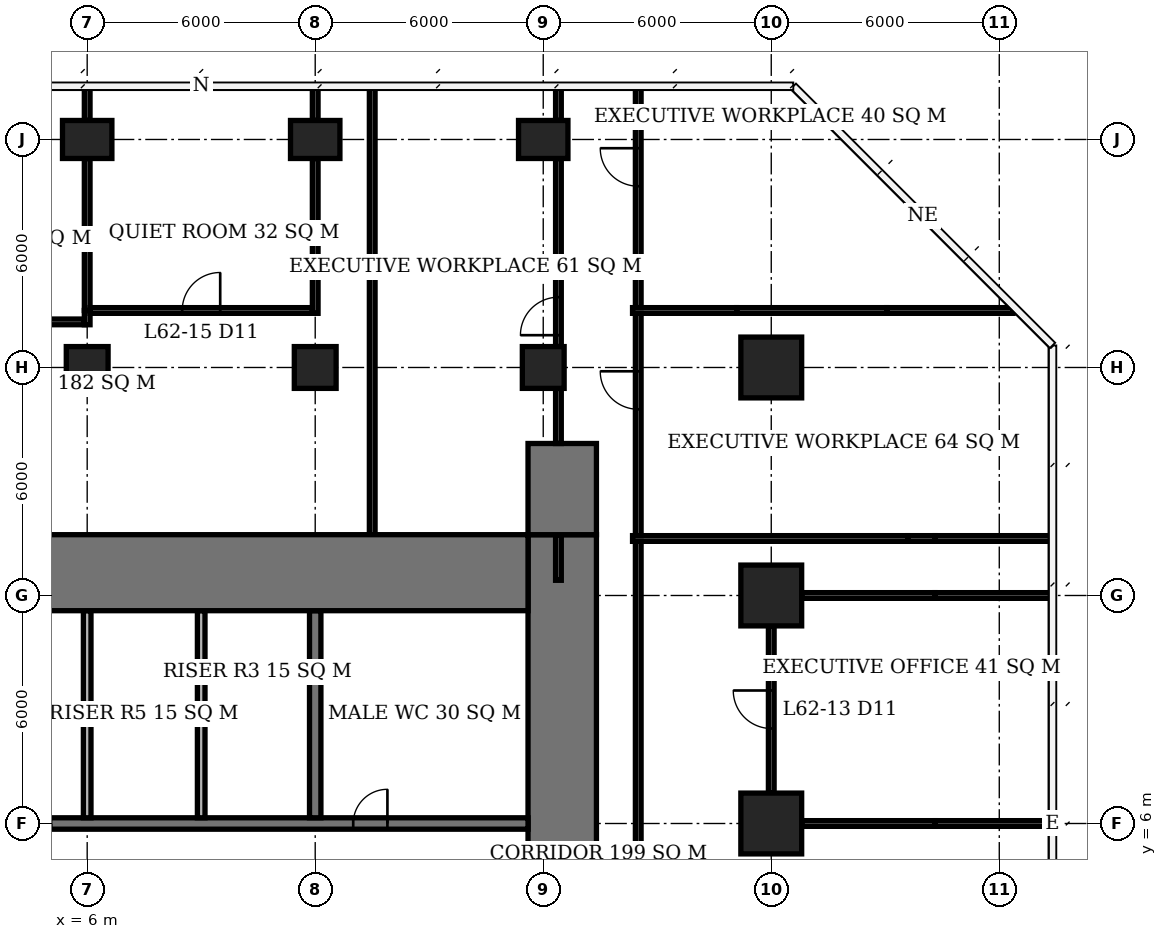
"""IFC4 building model, lengths in metres.
Left out: names, types, materials, properties, quantities, classifications, styles, units other than length and angle.
Written with IfcOpenShell. Run it as: python <this file> out.ifc"""

import sys

from ifc_helpers import new_model, si_unit, direction, frame, frame_2d, origin, origin_2d, place, context, subcontext, project, spatial, rectangle, extrude, element, fill, save


model = new_model("IFC4")
c1 = context("Model", 3, precision=1e-05, world=origin(), true_north=direction((0.0, 1.0)))
c2 = subcontext(c1, "Body", "Model", "MODEL_VIEW")
j1 = project(units=[si_unit("LENGTHUNIT", "METRE"), si_unit("PLANEANGLEUNIT", "RADIAN")], contexts=[c1])
p1 = place(None, origin())
s1 = spatial("IfcSite", under=j1, at=p1, CompositionType="ELEMENT")
p2 = place(p1, origin())
s2 = spatial("IfcBuilding", under=s1, at=p2, CompositionType="ELEMENT")
p3 = place(p2, frame((0.0, 0.0, 252.8)))
s3 = spatial("IfcBuildingStorey", under=s2, at=p3, CompositionType="ELEMENT", Elevation=252.8)
p4 = place(p3, frame((6.0, 18.0, 0.0), z_axis=(0.0, 0.0, 1.0), x_axis=(1.0, 0.0, 0.0)))
e1 = element("IfcColumn", 1, at=p4, inside=s3, PredefinedType="COLUMN", context=c2, shape_type="SweptSolid", body=[
    extrude(rectangle(XDim=1.1, YDim=1.1, at=origin_2d()), origin(), (0.0, 0.0, 1.0), 3.9),
])
p5 = place(p3, frame((6.0, 24.0, 0.0), z_axis=(0.0, 0.0, 1.0), x_axis=(1.0, 0.0, 0.0)))
e2 = element("IfcColumn", 2, at=p5, inside=s3, PredefinedType="COLUMN", context=c2, shape_type="SweptSolid", body=[
    extrude(rectangle(XDim=1.3, YDim=1.0, at=origin_2d()), origin(), (0.0, 0.0, 1.0), 3.9),
])
p6 = place(p3, frame((12.0, 18.0, 0.0), z_axis=(0.0, 0.0, 1.0), x_axis=(1.0, 0.0, 0.0)))
e3 = element("IfcColumn", 3, at=p6, inside=s3, PredefinedType="COLUMN", context=c2, shape_type="SweptSolid", body=[
    extrude(rectangle(XDim=1.1, YDim=1.1, at=origin_2d()), origin(), (0.0, 0.0, 1.0), 3.9),
])
p7 = place(p3, frame((12.0, 24.0, 0.0), z_axis=(0.0, 0.0, 1.0), x_axis=(1.0, 0.0, 0.0)))
e4 = element("IfcColumn", 4, at=p7, inside=s3, PredefinedType="COLUMN", context=c2, shape_type="SweptSolid", body=[
    extrude(rectangle(XDim=1.3, YDim=1.0, at=origin_2d()), origin(), (0.0, 0.0, 1.0), 3.9),
])
p8 = place(p3, frame((18.0, 18.0, 0.0), z_axis=(0.0, 0.0, 1.0), x_axis=(1.0, 0.0, 0.0)))
e5 = element("IfcColumn", 5, at=p8, inside=s3, PredefinedType="COLUMN", context=c2, shape_type="SweptSolid", body=[
    extrude(rectangle(XDim=1.1, YDim=1.1, at=origin_2d()), origin(), (0.0, 0.0, 1.0), 3.9),
])
p9 = place(p3, frame((18.0, 24.0, 0.0), z_axis=(0.0, 0.0, 1.0), x_axis=(1.0, 0.0, 0.0)))
e6 = element("IfcColumn", 6, at=p9, inside=s3, PredefinedType="COLUMN", context=c2, shape_type="SweptSolid", body=[
    extrude(rectangle(XDim=1.3, YDim=1.0, at=origin_2d()), origin(), (0.0, 0.0, 1.0), 3.9),
])
for number, where, z_axis, x_axis in (
    (7, (24.0, 6.0, 0.0), (0.0, 0.0, 1.0), (1.0, 0.0, 0.0)),
    (8, (24.0, 12.0, 0.0), (0.0, 0.0, 1.0), (1.0, 0.0, 0.0)),
    (9, (24.0, 18.0, 0.0), (0.0, 0.0, 1.0), (1.0, 0.0, 0.0)),
):
    element("IfcColumn", number, at=place(p3, frame(where, z_axis=z_axis, x_axis=x_axis)), inside=s3, PredefinedType="COLUMN", context=c2, shape_type="SweptSolid", body=[
        extrude(rectangle(XDim=1.6, YDim=1.6, at=origin_2d()), origin(), (0.0, 0.0, 1.0), 3.9),
    ])
p10 = place(p3, frame((-5.6, 12.6, 0.0), z_axis=(0.0, 0.0, 1.0), x_axis=(1.0, 0.0, 0.0)))
e10 = element("IfcWall", 10, at=p10, inside=s3, PredefinedType="SHEAR", context=c2, shape_type="SweptSolid", body=[
    extrude(rectangle(XDim=23.2, YDim=2.0, at=frame_2d((11.6, 0.0))), origin(), (0.0, 0.0, 1.0), 3.9),
])
p11 = place(p3, frame((18.5, -7.6, 0.0), z_axis=(0.0, 0.0, 1.0), x_axis=(0.0, 1.0, 0.0)))
e11 = element("IfcWall", 11, at=p11, inside=s3, PredefinedType="SHEAR", context=c2, shape_type="SweptSolid", body=[
    extrude(rectangle(XDim=21.2, YDim=1.8, at=frame_2d((10.6, 0.0))), origin(), (0.0, 0.0, 1.0), 3.9),
])
p12 = place(p11, frame((9.2, 0.0, 0.0)))
e12 = element("IfcOpeningElement", 12, at=p12, cuts=e11, PredefinedType="OPENING", context=c2, shape_type="SweptSolid", body=[
    extrude(rectangle(XDim=1.8, YDim=2.4, at=frame_2d((0.9, 1.2))), frame((0.0, 0.91, 0.0), z_axis=(0.0, -1.0, 0.0), x_axis=(1.0, 0.0, 0.0)), (0.0, 0.0, 1.0), 1.82),
])
p13 = place(p3, frame((18.5, 13.6, 0.0), z_axis=(0.0, 0.0, 1.0), x_axis=(0.0, 1.0, 0.0)))
e13 = element("IfcWall", 13, at=p13, inside=s3, PredefinedType="SHEAR", context=c2, shape_type="SweptSolid", body=[
    extrude(rectangle(XDim=2.4, YDim=1.8, at=frame_2d((1.2, 0.0))), origin(), (0.0, 0.0, 1.0), 3.9),
])
p14 = place(p3, frame((-0.15, 6.0, 0.0), z_axis=(0.0, 0.0, 1.0), x_axis=(1.0, 0.0, 0.0)))
e14 = element("IfcWall", 14, at=p14, inside=s3, PredefinedType="SHEAR", context=c2, shape_type="SweptSolid", body=[
    extrude(rectangle(XDim=17.75, YDim=0.3, at=frame_2d((8.875, 0.0))), origin(), (0.0, 0.0, 1.0), 3.9),
])
p15 = place(p14, frame((13.15, 0.0, 0.0)))
e15 = element("IfcOpeningElement", 15, at=p15, cuts=e14, PredefinedType="OPENING", context=c2, shape_type="SweptSolid", body=[
    extrude(rectangle(XDim=0.9, YDim=2.1, at=frame_2d((0.45, 1.05))), frame((0.0, 0.16, 0.0), z_axis=(0.0, -1.0, 0.0), x_axis=(1.0, 0.0, 0.0)), (0.0, 0.0, 1.0), 0.32),
])
p16 = place(p14, frame((1.1, 0.0, 0.0)))
e16 = element("IfcOpeningElement", 16, at=p16, cuts=e14, PredefinedType="OPENING", context=c2, shape_type="SweptSolid", body=[
    extrude(rectangle(XDim=1.1, YDim=2.1, at=frame_2d((0.55, 1.05))), frame((0.0, 0.16, 0.0), z_axis=(0.0, -1.0, 0.0), x_axis=(1.0, 0.0, 0.0)), (0.0, 0.0, 1.0), 0.32),
])
p17 = place(p14, frame((4.1, 0.0, 0.0)))
e17 = element("IfcOpeningElement", 17, at=p17, cuts=e14, PredefinedType="OPENING", context=c2, shape_type="SweptSolid", body=[
    extrude(rectangle(XDim=1.1, YDim=2.1, at=frame_2d((0.55, 1.05))), frame((0.0, 0.16, 0.0), z_axis=(0.0, -1.0, 0.0), x_axis=(1.0, 0.0, 0.0)), (0.0, 0.0, 1.0), 0.32),
])
p18 = place(p3, frame((12.0, 6.15, 0.0), z_axis=(0.0, 0.0, 1.0), x_axis=(0.0, 1.0, 0.0)))
e18 = element("IfcWall", 18, at=p18, inside=s3, PredefinedType="SHEAR", context=c2, shape_type="SweptSolid", body=[
    extrude(rectangle(XDim=5.45, YDim=0.3, at=frame_2d((2.725, 0.0))), origin(), (0.0, 0.0, 1.0), 3.9),
])
for number, where, z_axis, x_axis in (
    (19, (6.0, 6.15, 0.0), (0.0, 0.0, 1.0), (0.0, 1.0, 0.0)),
    (20, (9.0, 6.15, 0.0), (0.0, 0.0, 1.0), (0.0, 1.0, 0.0)),
):
    element("IfcWall", number, at=place(p3, frame(where, z_axis=z_axis, x_axis=x_axis)), inside=s3, PredefinedType="SOLIDWALL", context=c2, shape_type="SweptSolid", body=[
        extrude(rectangle(XDim=5.45, YDim=0.2, at=frame_2d((2.725, 0.0))), origin(), (0.0, 0.0, 1.0), 3.9),
    ])
p19 = place(p3, frame((24.8, 6.0, 0.0), z_axis=(0.0, 0.0, 1.0), x_axis=(1.0, 0.0, 0.0)))
e21 = element("IfcWall", 21, at=p19, inside=s3, PredefinedType="PARTITIONING", context=c2, shape_type="SweptSolid", body=[
    extrude(rectangle(XDim=3.51, YDim=0.15, at=frame_2d((1.755, 0.0))), origin(), (0.0, 0.0, 1.0), 2.65),
])
p20 = place(p3, frame((28.31, 6.0, 0.0), z_axis=(0.0, 0.0, 1.0), x_axis=(1.0, 0.0, 0.0)))
e22 = element("IfcWall", 22, at=p20, inside=s3, PredefinedType="PARTITIONING", context=c2, shape_type="SweptSolid", body=[
    extrude(rectangle(XDim=3.04, YDim=0.15, at=frame_2d((1.52, 0.0))), origin(), (0.0, 0.0, 1.0), 3.65),
])
p21 = place(p3, frame((24.8, 12.0, 0.0), z_axis=(0.0, 0.0, 1.0), x_axis=(1.0, 0.0, 0.0)))
e23 = element("IfcWall", 23, at=p21, inside=s3, PredefinedType="PARTITIONING", context=c2, shape_type="SweptSolid", body=[
    extrude(rectangle(XDim=3.51, YDim=0.15, at=frame_2d((1.755, 0.0))), origin(), (0.0, 0.0, 1.0), 2.65),
])
p22 = place(p3, frame((28.31, 12.0, 0.0), z_axis=(0.0, 0.0, 1.0), x_axis=(1.0, 0.0, 0.0)))
e24 = element("IfcWall", 24, at=p22, inside=s3, PredefinedType="PARTITIONING", context=c2, shape_type="SweptSolid", body=[
    extrude(rectangle(XDim=3.065, YDim=0.15, at=frame_2d((1.532, 0.0))), origin(), (0.0, 0.0, 1.0), 3.65),
])
p23 = place(p3, frame((0.075, 19.2, 0.0), z_axis=(0.0, 0.0, 1.0), x_axis=(1.0, 0.0, 0.0)))
e25 = element("IfcWall", 25, at=p23, inside=s3, PredefinedType="PARTITIONING", context=c2, shape_type="SweptSolid", body=[
    extrude(rectangle(XDim=5.85, YDim=0.15, at=frame_2d((2.925, 0.0))), origin(), (0.0, 0.0, 1.0), 3.65),
])
p24 = place(p23, frame((2.425, 0.0, 0.0)))
e26 = element("IfcOpeningElement", 26, at=p24, cuts=e25, PredefinedType="OPENING", context=c2, shape_type="SweptSolid", body=[
    extrude(rectangle(XDim=1.0, YDim=2.4, at=frame_2d((0.5, 1.2))), frame((0.0, 0.085, 0.0), z_axis=(0.0, -1.0, 0.0), x_axis=(1.0, 0.0, 0.0)), (0.0, 0.0, 1.0), 0.17),
])
p25 = place(p3, frame((6.075, 19.5, 0.0), z_axis=(0.0, 0.0, 1.0), x_axis=(1.0, 0.0, 0.0)))
e27 = element("IfcWall", 27, at=p25, inside=s3, PredefinedType="PARTITIONING", context=c2, shape_type="SweptSolid", body=[
    extrude(rectangle(XDim=5.85, YDim=0.15, at=frame_2d((2.925, 0.0))), origin(), (0.0, 0.0, 1.0), 3.65),
])
p26 = place(p25, frame((2.425, 0.0, 0.0)))
e28 = element("IfcOpeningElement", 28, at=p26, cuts=e27, PredefinedType="OPENING", context=c2, shape_type="SweptSolid", body=[
    extrude(rectangle(XDim=1.0, YDim=2.4, at=frame_2d((0.5, 1.2))), frame((0.0, 0.085, 0.0), z_axis=(0.0, -1.0, 0.0), x_axis=(1.0, 0.0, 0.0)), (0.0, 0.0, 1.0), 0.17),
])
p27 = place(p3, frame((6.0, 19.125, 0.0), z_axis=(0.0, 0.0, 1.0), x_axis=(0.0, 1.0, 0.0)))
e29 = element("IfcWall", 29, at=p27, inside=s3, PredefinedType="PARTITIONING", context=c2, shape_type="SweptSolid", body=[
    extrude(rectangle(XDim=0.375, YDim=0.15, at=frame_2d((0.188, 0.0))), origin(), (0.0, 0.0, 1.0), 3.65),
])
p28 = place(p3, frame((6.0, 19.5, 0.0), z_axis=(0.0, 0.0, 1.0), x_axis=(0.0, 1.0, 0.0)))
e30 = element("IfcWall", 30, at=p28, inside=s3, PredefinedType="PARTITIONING", context=c2, shape_type="SweptSolid", body=[
    extrude(rectangle(XDim=4.0, YDim=0.15, at=frame_2d((2.0, 0.0))), origin(), (0.0, 0.0, 1.0), 3.65),
])
p29 = place(p3, frame((6.0, 24.5, 0.0), z_axis=(0.0, 0.0, 1.0), x_axis=(0.0, 1.0, 0.0)))
e31 = element("IfcWall", 31, at=p29, inside=s3, PredefinedType="PARTITIONING", context=c2, shape_type="SweptSolid", body=[
    extrude(rectangle(XDim=0.85, YDim=0.15, at=frame_2d((0.425, 0.0))), origin(), (0.0, 0.0, 1.0), 3.65),
])
p30 = place(p3, frame((12.0, 19.425, 0.0), z_axis=(0.0, 0.0, 1.0), x_axis=(0.0, 1.0, 0.0)))
e32 = element("IfcWall", 32, at=p30, inside=s3, PredefinedType="PARTITIONING", context=c2, shape_type="SweptSolid", body=[
    extrude(rectangle(XDim=4.075, YDim=0.15, at=frame_2d((2.038, 0.0))), origin(), (0.0, 0.0, 1.0), 3.65),
])
p31 = place(p3, frame((12.0, 24.5, 0.0), z_axis=(0.0, 0.0, 1.0), x_axis=(0.0, 1.0, 0.0)))
e33 = element("IfcWall", 33, at=p31, inside=s3, PredefinedType="PARTITIONING", context=c2, shape_type="SweptSolid", body=[
    extrude(rectangle(XDim=0.85, YDim=0.15, at=frame_2d((0.425, 0.0))), origin(), (0.0, 0.0, 1.0), 3.65),
])
p32 = place(p3, frame((24.0, 6.8, 0.0), z_axis=(0.0, 0.0, 1.0), x_axis=(0.0, 1.0, 0.0)))
e34 = element("IfcWall", 34, at=p32, inside=s3, PredefinedType="PARTITIONING", context=c2, shape_type="SweptSolid", body=[
    extrude(rectangle(XDim=4.4, YDim=0.15, at=frame_2d((2.2, 0.0))), origin(), (0.0, 0.0, 1.0), 3.65),
])
p33 = place(p32, frame((1.7, 0.0, 0.0)))
e35 = element("IfcOpeningElement", 35, at=p33, cuts=e34, PredefinedType="OPENING", context=c2, shape_type="SweptSolid", body=[
    extrude(rectangle(XDim=1.0, YDim=2.4, at=frame_2d((0.5, 1.2))), frame((0.0, 0.085, 0.0), z_axis=(0.0, -1.0, 0.0), x_axis=(1.0, 0.0, 0.0)), (0.0, 0.0, 1.0), 0.17),
])
p34 = place(p3, frame((13.5, 12.4, 0.0), z_axis=(0.0, 0.0, 1.0), x_axis=(0.0, 1.0, 0.0)))
e36 = element("IfcWall", 36, at=p34, inside=s3, PredefinedType="PARTITIONING", context=c2, shape_type="SweptSolid", body=[
    extrude(rectangle(XDim=12.975, YDim=0.15, at=frame_2d((6.488, 0.0))), origin(), (0.0, 0.0, 1.0), 3.65),
])
p35 = place(p3, frame((18.4, 12.4, 0.0), z_axis=(0.0, 0.0, 1.0), x_axis=(0.0, 1.0, 0.0)))
e37 = element("IfcWall", 37, at=p35, inside=s3, PredefinedType="PARTITIONING", context=c2, shape_type="SweptSolid", body=[
    extrude(rectangle(XDim=1.2, YDim=0.15, at=frame_2d((0.6, 0.0))), origin(), (0.0, 0.0, 1.0), 3.65),
])
p36 = place(p3, frame((18.4, 16.0, 0.0), z_axis=(0.0, 0.0, 1.0), x_axis=(0.0, 1.0, 0.0)))
e38 = element("IfcWall", 38, at=p36, inside=s3, PredefinedType="PARTITIONING", context=c2, shape_type="SweptSolid", body=[
    extrude(rectangle(XDim=1.45, YDim=0.15, at=frame_2d((0.725, 0.0))), origin(), (0.0, 0.0, 1.0), 3.65),
])
p37 = place(p3, frame((18.4, 18.55, 0.0), z_axis=(0.0, 0.0, 1.0), x_axis=(0.0, 1.0, 0.0)))
e39 = element("IfcWall", 39, at=p37, inside=s3, PredefinedType="PARTITIONING", context=c2, shape_type="SweptSolid", body=[
    extrude(rectangle(XDim=4.95, YDim=0.15, at=frame_2d((2.475, 0.0))), origin(), (0.0, 0.0, 1.0), 3.65),
])
p38 = place(p37, frame((0.3, 0.0, 0.0)))
e40 = element("IfcOpeningElement", 40, at=p38, cuts=e39, PredefinedType="OPENING", context=c2, shape_type="SweptSolid", body=[
    extrude(rectangle(XDim=1.0, YDim=2.4, at=frame_2d((0.5, 1.2))), frame((0.0, 0.085, 0.0), z_axis=(0.0, -1.0, 0.0), x_axis=(1.0, 0.0, 0.0)), (0.0, 0.0, 1.0), 0.17),
])
p39 = place(p3, frame((18.4, 24.5, 0.0), z_axis=(0.0, 0.0, 1.0), x_axis=(0.0, 1.0, 0.0)))
e41 = element("IfcWall", 41, at=p39, inside=s3, PredefinedType="PARTITIONING", context=c2, shape_type="SweptSolid", body=[
    extrude(rectangle(XDim=0.85, YDim=0.15, at=frame_2d((0.425, 0.0))), origin(), (0.0, 0.0, 1.0), 3.65),
])
p40 = place(p3, frame((20.5, -13.375, 0.0), z_axis=(0.0, 0.0, 1.0), x_axis=(0.0, 1.0, 0.0)))
e42 = element("IfcWall", 42, at=p40, inside=s3, PredefinedType="PARTITIONING", context=c2, shape_type="SweptSolid", body=[
    extrude(rectangle(XDim=26.8, YDim=0.15, at=frame_2d((13.4, 0.0))), origin(), (0.0, 0.0, 1.0), 3.65),
])
p41 = place(p40, frame((16.995, 0.0, 0.0)))
e43 = element("IfcOpeningElement", 43, at=p41, cuts=e42, PredefinedType="OPENING", context=c2, shape_type="SweptSolid", body=[
    extrude(rectangle(XDim=1.0, YDim=2.4, at=frame_2d((0.5, 1.2))), frame((0.0, 0.085, 0.0), z_axis=(0.0, -1.0, 0.0), x_axis=(1.0, 0.0, 0.0)), (0.0, 0.0, 1.0), 0.17),
])
p42 = place(p3, frame((20.5, 13.575, 0.0), z_axis=(0.0, 0.0, 1.0), x_axis=(0.0, 1.0, 0.0)))
e44 = element("IfcWall", 44, at=p42, inside=s3, PredefinedType="PARTITIONING", context=c2, shape_type="SweptSolid", body=[
    extrude(rectangle(XDim=5.85, YDim=0.15, at=frame_2d((2.925, 0.0))), origin(), (0.0, 0.0, 1.0), 3.65),
])
p43 = place(p42, frame((3.325, 0.0, 0.0)))
e45 = element("IfcOpeningElement", 45, at=p43, cuts=e44, PredefinedType="OPENING", context=c2, shape_type="SweptSolid", body=[
    extrude(rectangle(XDim=1.0, YDim=2.4, at=frame_2d((0.5, 1.2))), frame((0.0, 0.085, 0.0), z_axis=(0.0, -1.0, 0.0), x_axis=(1.0, 0.0, 0.0)), (0.0, 0.0, 1.0), 0.17),
])
p44 = place(p3, frame((20.35, 13.5, 0.0), z_axis=(0.0, 0.0, 1.0), x_axis=(1.0, 0.0, 0.0)))
e46 = element("IfcWall", 46, at=p44, inside=s3, PredefinedType="PARTITIONING", context=c2, shape_type="SweptSolid", body=[
    extrude(rectangle(XDim=7.24, YDim=0.15, at=frame_2d((3.62, 0.0))), origin(), (0.0, 0.0, 1.0), 3.65),
])
p45 = place(p3, frame((27.59, 13.5, 0.0), z_axis=(0.0, 0.0, 1.0), x_axis=(1.0, 0.0, 0.0)))
e47 = element("IfcWall", 47, at=p45, inside=s3, PredefinedType="PARTITIONING", context=c2, shape_type="SweptSolid", body=[
    extrude(rectangle(XDim=0.72, YDim=0.15, at=frame_2d((0.36, 0.0))), origin(), (0.0, 0.0, 1.0), 2.65),
])
p46 = place(p3, frame((28.31, 13.5, 0.0), z_axis=(0.0, 0.0, 1.0), x_axis=(1.0, 0.0, 0.0)))
e48 = element("IfcWall", 48, at=p46, inside=s3, PredefinedType="PARTITIONING", context=c2, shape_type="SweptSolid", body=[
    extrude(rectangle(XDim=3.065, YDim=0.15, at=frame_2d((1.532, 0.0))), origin(), (0.0, 0.0, 1.0), 3.65),
])
p47 = place(p3, frame((20.5, 19.575, 0.0), z_axis=(0.0, 0.0, 1.0), x_axis=(0.0, 1.0, 0.0)))
e49 = element("IfcWall", 49, at=p47, inside=s3, PredefinedType="PARTITIONING", context=c2, shape_type="SweptSolid", body=[
    extrude(rectangle(XDim=5.8, YDim=0.15, at=frame_2d((2.9, 0.0))), origin(), (0.0, 0.0, 1.0), 3.65),
])
p48 = place(p47, frame((3.195, 0.0, 0.0)))
e50 = element("IfcOpeningElement", 50, at=p48, cuts=e49, PredefinedType="OPENING", context=c2, shape_type="SweptSolid", body=[
    extrude(rectangle(XDim=1.0, YDim=2.4, at=frame_2d((0.5, 1.2))), frame((0.0, 0.085, 0.0), z_axis=(0.0, -1.0, 0.0), x_axis=(1.0, 0.0, 0.0)), (0.0, 0.0, 1.0), 0.17),
])
p49 = place(p3, frame((20.35, 19.5, 0.0), z_axis=(0.0, 0.0, 1.0), x_axis=(1.0, 0.0, 0.0)))
e51 = element("IfcWall", 51, at=p49, inside=s3, PredefinedType="PARTITIONING", context=c2, shape_type="SweptSolid", body=[
    extrude(rectangle(XDim=2.74, YDim=0.15, at=frame_2d((1.37, 0.0))), origin(), (0.0, 0.0, 1.0), 3.65),
])
p50 = place(p3, frame((23.09, 19.5, 0.0), z_axis=(0.0, 0.0, 1.0), x_axis=(1.0, 0.0, 0.0)))
e52 = element("IfcWall", 52, at=p50, inside=s3, PredefinedType="PARTITIONING", context=c2, shape_type="SweptSolid", body=[
    extrude(rectangle(XDim=3.95, YDim=0.15, at=frame_2d((1.975, 0.0))), origin(), (0.0, 0.0, 1.0), 2.65),
])
p51 = place(p3, frame((27.04, 19.5, 0.0), z_axis=(0.0, 0.0, 1.0), x_axis=(1.0, 0.0, 0.0)))
e53 = element("IfcWall", 53, at=p51, inside=s3, PredefinedType="PARTITIONING", context=c2, shape_type="SweptSolid", body=[
    extrude(rectangle(XDim=3.323, YDim=0.15, at=frame_2d((1.662, 0.0))), origin(), (0.0, 0.0, 1.0), 3.65),
])
p52 = place(p15, origin())
e54 = element("IfcDoor", 54, at=p52, inside=s3, OperationType="SINGLE_SWING_RIGHT", PredefinedType="DOOR", context=c2, shape_type="SweptSolid", body=[
    extrude(rectangle(XDim=0.9, YDim=2.1, at=frame_2d((0.45, 1.05))), frame((0.0, 0.025, 0.0), z_axis=(0.0, -1.0, 0.0), x_axis=(1.0, 0.0, 0.0)), (0.0, 0.0, 1.0), 0.05),
])
fill(e15, e54)
p53 = place(p33, origin())
e55 = element("IfcDoor", 55, at=p53, inside=s3, OperationType="SINGLE_SWING_RIGHT", PredefinedType="DOOR", context=c2, shape_type="SweptSolid", body=[
    extrude(rectangle(XDim=1.0, YDim=2.4, at=frame_2d((0.5, 1.2))), frame((0.0, 0.025, 0.0), z_axis=(0.0, -1.0, 0.0), x_axis=(1.0, 0.0, 0.0)), (0.0, 0.0, 1.0), 0.05),
])
fill(e35, e55)
p54 = place(p26, origin())
e56 = element("IfcDoor", 56, at=p54, inside=s3, OperationType="SINGLE_SWING_RIGHT", PredefinedType="DOOR", context=c2, shape_type="SweptSolid", body=[
    extrude(rectangle(XDim=1.0, YDim=2.4, at=frame_2d((0.5, 1.2))), frame((0.0, 0.025, 0.0), z_axis=(0.0, -1.0, 0.0), x_axis=(1.0, 0.0, 0.0)), (0.0, 0.0, 1.0), 0.05),
])
fill(e28, e56)
p55 = place(p43, origin())
e57 = element("IfcDoor", 57, at=p55, inside=s3, OperationType="SINGLE_SWING_RIGHT", PredefinedType="DOOR", context=c2, shape_type="SweptSolid", body=[
    extrude(rectangle(XDim=1.0, YDim=2.4, at=frame_2d((0.5, 1.2))), frame((0.0, 0.025, 0.0), z_axis=(0.0, -1.0, 0.0), x_axis=(1.0, 0.0, 0.0)), (0.0, 0.0, 1.0), 0.05),
])
fill(e45, e57)
p56 = place(p38, origin())
e58 = element("IfcDoor", 58, at=p56, inside=s3, OperationType="SINGLE_SWING_LEFT", PredefinedType="DOOR", context=c2, shape_type="SweptSolid", body=[
    extrude(rectangle(XDim=1.0, YDim=2.4, at=frame_2d((0.5, 1.2))), frame((0.0, 0.025, 0.0), z_axis=(0.0, -1.0, 0.0), x_axis=(1.0, 0.0, 0.0)), (0.0, 0.0, 1.0), 0.05),
])
fill(e40, e58)
p57 = place(p48, origin())
e59 = element("IfcDoor", 59, at=p57, inside=s3, OperationType="SINGLE_SWING_RIGHT", PredefinedType="DOOR", context=c2, shape_type="SweptSolid", body=[
    extrude(rectangle(XDim=1.0, YDim=2.4, at=frame_2d((0.5, 1.2))), frame((0.0, 0.025, 0.0), z_axis=(0.0, -1.0, 0.0), x_axis=(1.0, 0.0, 0.0)), (0.0, 0.0, 1.0), 0.05),
])
fill(e50, e59)
save(model, sys.argv[1])
